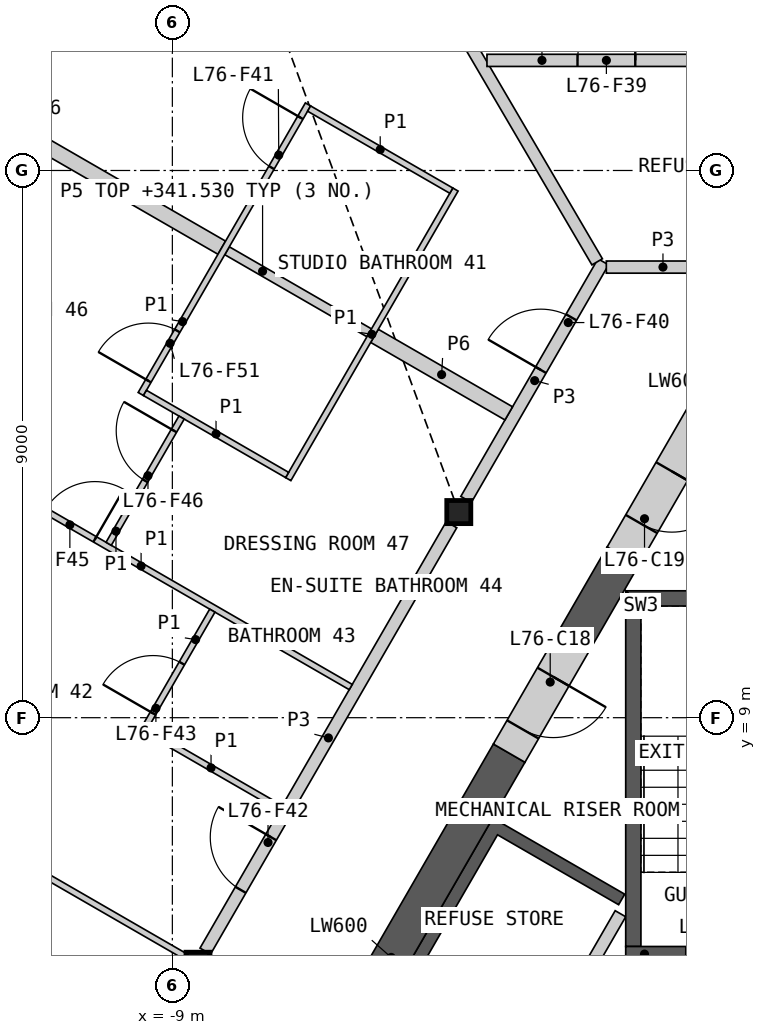
"""IFC4 building model, lengths in metres.
Left out: names, types, materials, properties, quantities, classifications, styles, units other than length and angle.
Written with IfcOpenShell. Run it as: python <this file> out.ifc"""

import sys

from ifc_helpers import new_model, si_unit, direction, frame, frame_2d, origin, origin_2d, place, context, subcontext, project, spatial, polyline, rectangle, i_section, outline, extrude, element, fill, save


model = new_model("IFC4")
c1 = context("Model", 3, precision=1e-05, world=origin(), true_north=direction((0.0, 1.0)))
c2 = subcontext(c1, "Body", "Model", "MODEL_VIEW")
j1 = project(units=[si_unit("LENGTHUNIT", "METRE"), si_unit("PLANEANGLEUNIT", "RADIAN")], contexts=[c1])
p1 = place(None, origin())
s1 = spatial("IfcSite", under=j1, at=p1, CompositionType="ELEMENT")
p2 = place(p1, origin())
s2 = spatial("IfcBuilding", under=s1, at=p2, CompositionType="ELEMENT")
p3 = place(p2, frame((0.0, 0.0, 339.2)))
s3 = spatial("IfcBuildingStorey", under=s2, at=p3, CompositionType="ELEMENT", Elevation=339.2)
for number, where, z_axis, x_axis in (
    (1, (-4.289, 12.382, 0.0), (0.0, 0.0, 1.0), (1.0, 0.0, 0.0)),
    (2, (-8.578, 4.953, 0.0), (0.0, 0.0, 1.0), (1.0, 0.0, 0.0)),
):
    element("IfcColumn", number, at=place(p3, frame(where, z_axis=z_axis, x_axis=x_axis)), inside=s3, PredefinedType="COLUMN", context=c2, shape_type="SweptSolid", body=[
        extrude(i_section(OverallWidth=0.396, OverallDepth=0.381, WebThickness=0.019, FlangeThickness=0.03, at=origin_2d()), origin(), (0.0, 0.0, 1.0), 3.4),
    ])
p4 = place(p3, origin())
e3 = element("IfcWall", 3, at=p4, inside=s3, PredefinedType="SHEAR", context=c2, shape_type="SweptSolid", body=[
    extrude(outline(polyline([(-4.96, 0.208), (-7.131, 1.461), (-3.731, 7.35), (-1.561, 6.097), (-1.66, 5.924), (-3.652, 7.074), (-5.752, 3.437), (-3.76, 2.287), (-3.861, 2.113), (-5.852, 3.263), (-6.852, 1.531), (-4.861, 0.381), (-4.96, 0.208)])), origin(), (0.0, 0.0, 1.0), 3.1),
])
p5 = place(p3, frame((-1.631, 5.776, 0.0), z_axis=(0.0, 0.0, 1.0), x_axis=(-0.499992876559, -0.866029516466, 0.0)))
e4 = element("IfcWall", 4, at=p5, inside=s3, PredefinedType="SOLIDWALL", context=c2, shape_type="SweptSolid", body=[
    extrude(rectangle(XDim=6.486, YDim=0.2, at=frame_2d((3.243, 0.0))), origin(), (0.0, 0.0, 1.0), 3.1),
])
p6 = place(p5, frame((1.537, 0.0, 0.0)))
e5 = element("IfcOpeningElement", 5, at=p6, cuts=e4, PredefinedType="OPENING", context=c2, shape_type="SweptSolid", body=[
    extrude(rectangle(XDim=0.9, YDim=2.1, at=frame_2d((0.45, 1.05))), frame((0.0, 0.11, 0.0), z_axis=(0.0, -1.0, 0.0), x_axis=(1.0, 0.0, 0.0)), (0.0, 0.0, 1.0), 0.22),
])
p7 = place(p5, frame((4.837, 0.0, 0.0)))
e6 = element("IfcOpeningElement", 6, at=p7, cuts=e4, PredefinedType="OPENING", context=c2, shape_type="SweptSolid", body=[
    extrude(rectangle(XDim=0.9, YDim=2.1, at=frame_2d((0.45, 1.05))), frame((0.0, 0.11, 0.0), z_axis=(0.0, -1.0, 0.0), x_axis=(1.0, 0.0, 0.0)), (0.0, 0.0, 1.0), 0.22),
])
p8 = place(p3, origin())
e7 = element("IfcWall", 7, at=p8, inside=s3, PredefinedType="SHEAR", context=c2, shape_type="SweptSolid", body=[
    extrude(outline(polyline([(1.544, 11.087), (-1.544, 11.087), (-1.294, 10.837), (1.294, 10.837), (1.544, 11.087)])), origin(), (0.0, 0.0, 1.0), 3.1),
])
p9 = place(p3, origin())
e8 = element("IfcWall", 8, at=p9, inside=s3, PredefinedType="SHEAR", context=c2, shape_type="SweptSolid", body=[
    extrude(outline(polyline([(-1.294, 10.837), (-1.544, 11.087), (-1.544, 5.237), (-1.294, 5.237), (-1.294, 10.837)])), origin(), (0.0, 0.0, 1.0), 3.1),
])
p10 = place(p3, frame((1.544, 5.112, 0.0), z_axis=(0.0, 0.0, 1.0), x_axis=(-1.0, 0.0, 0.0)))
e9 = element("IfcWall", 9, at=p10, inside=s3, PredefinedType="SHEAR", context=c2, shape_type="SweptSolid", body=[
    extrude(rectangle(XDim=3.088, YDim=0.25, at=frame_2d((1.544, 0.0))), origin(), (0.0, 0.0, 1.0), 3.1),
])
p11 = place(p10, frame((0.994, 0.0, 0.0)))
e10 = element("IfcOpeningElement", 10, at=p11, cuts=e9, PredefinedType="OPENING", context=c2, shape_type="SweptSolid", body=[
    extrude(rectangle(XDim=1.1, YDim=2.1, at=frame_2d((0.55, 1.05))), frame((0.0, 0.135, 0.0), z_axis=(0.0, -1.0, 0.0), x_axis=(1.0, 0.0, 0.0)), (0.0, 0.0, 1.0), 0.27),
])
p12 = place(p3, frame((-3.461, 8.417, 0.0), z_axis=(0.0, 0.0, 1.0), x_axis=(-0.50000391502, -0.866023143435, 0.0)))
e11 = element("IfcWall", 11, at=p12, inside=s3, PredefinedType="SHEAR", context=c2, shape_type="SweptSolid", body=[
    extrude(rectangle(XDim=7.759, YDim=0.6, at=frame_2d((3.879, 0.0))), origin(), (0.0, 0.0, 1.0), 3.1),
])
p13 = place(p3, frame((-1.59, 11.658, 0.0), z_axis=(0.0, 0.0, 1.0), x_axis=(-0.500037594623, -0.866003697431, 0.0)))
e12 = element("IfcWall", 12, at=p13, inside=s3, PredefinedType="SHEAR", context=c2, shape_type="SweptSolid", body=[
    extrude(rectangle(XDim=1.542, YDim=0.6, at=frame_2d((0.771, 0.0))), origin(), (0.0, 0.0, 1.0), 3.1),
])
p14 = place(p3, frame((-2.361, 10.322, 0.0), z_axis=(0.0, 0.0, 1.0), x_axis=(-0.499946605688, -0.86605622881, 0.0)))
e13 = element("IfcWall", 13, at=p14, inside=s3, PredefinedType="SHEAR", context=c2, shape_type="SweptSolid", body=[
    extrude(rectangle(XDim=2.2, YDim=0.6, at=frame_2d((1.1, 0.0))), origin(), (0.0, 0.0, 1.0), 3.1),
])
p15 = place(p14, frame((0.75, 0.0, 0.0)))
e14 = element("IfcOpeningElement", 14, at=p15, cuts=e13, PredefinedType="OPENING", context=c2, shape_type="SweptSolid", body=[
    extrude(rectangle(XDim=1.0, YDim=2.1, at=frame_2d((0.5, 1.05))), frame((0.0, 0.31, 0.0), z_axis=(0.0, -1.0, 0.0), x_axis=(1.0, 0.0, 0.0)), (0.0, 0.0, 1.0), 0.62),
])
p16 = place(p3, frame((-0.26, 13.961, 0.0), z_axis=(0.0, 0.0, 1.0), x_axis=(-0.49997936161, -0.866037319036, 0.0)))
e15 = element("IfcWall", 15, at=p16, inside=s3, PredefinedType="SHEAR", context=c2, shape_type="SweptSolid", body=[
    extrude(rectangle(XDim=2.66, YDim=0.6, at=frame_2d((1.33, 0.0))), origin(), (0.0, 0.0, 1.0), 3.1),
])
p17 = place(p16, frame((1.05, 0.0, 0.0)))
e16 = element("IfcOpeningElement", 16, at=p17, cuts=e15, PredefinedType="OPENING", context=c2, shape_type="SweptSolid", body=[
    extrude(rectangle(XDim=1.0, YDim=2.1, at=frame_2d((0.5, 1.05))), frame((0.0, 0.31, 0.0), z_axis=(0.0, -1.0, 0.0), x_axis=(1.0, 0.0, 0.0)), (0.0, 0.0, 1.0), 0.62),
])
p18 = place(p3, frame((-8.458, 5.16, 0.0), z_axis=(0.0, 0.0, 1.0), x_axis=(0.499984266882, 0.866034487114, 0.0)))
e17 = element("IfcWall", 17, at=p18, inside=s3, PredefinedType="PARTITIONING", context=c2, shape_type="SweptSolid", body=[
    extrude(rectangle(XDim=8.099, YDim=0.2, at=frame_2d((4.049, 0.0))), origin(), (0.0, 0.0, 1.0), 3.1),
])
p19 = place(p18, frame((1.164, 0.0, 0.0)))
e18 = element("IfcOpeningElement", 18, at=p19, cuts=e17, PredefinedType="OPENING", context=c2, shape_type="SweptSolid", body=[
    extrude(rectangle(XDim=1.0, YDim=2.1, at=frame_2d((0.5, 1.05))), frame((0.0, 0.11, 0.0), z_axis=(0.0, -1.0, 0.0), x_axis=(1.0, 0.0, 0.0)), (0.0, 0.0, 1.0), 0.22),
])
p20 = place(p3, frame((-14.417, 20.327, 0.0), z_axis=(0.0, 0.0, 1.0), x_axis=(0.866018271907, -0.50001235257, 0.0)))
e19 = element("IfcWall", 19, at=p20, inside=s3, PredefinedType="PARTITIONING", context=c2, shape_type="SweptSolid", body=[
    extrude(rectangle(XDim=7.193, YDim=0.25, at=frame_2d((3.596, 0.0))), origin(), (0.0, 0.0, 1.0), 2.33),
])
p21 = place(p3, frame((-4.169, 12.59, 0.0), z_axis=(0.0, 0.0, 1.0), x_axis=(0.499950370306, 0.866054055606, 0.0)))
e20 = element("IfcWall", 20, at=p21, inside=s3, PredefinedType="PARTITIONING", context=c2, shape_type="SweptSolid", body=[
    extrude(rectangle(XDim=4.513, YDim=0.2, at=frame_2d((2.256, 0.0))), origin(), (0.0, 0.0, 1.0), 3.1),
])
p22 = place(p21, frame((2.459, 0.0, 0.0)))
e21 = element("IfcOpeningElement", 21, at=p22, cuts=e20, PredefinedType="OPENING", context=c2, shape_type="SweptSolid", body=[
    extrude(rectangle(XDim=1.0, YDim=2.1, at=frame_2d((0.5, 1.05))), frame((0.0, 0.11, 0.0), z_axis=(0.0, -1.0, 0.0), x_axis=(1.0, 0.0, 0.0)), (0.0, 0.0, 1.0), 0.22),
])
p23 = place(p3, frame((-1.863, 16.411, 0.0), z_axis=(0.0, 0.0, 1.0), x_axis=(1.0, 0.0, 0.0)))
e22 = element("IfcWall", 22, at=p23, inside=s3, PredefinedType="PARTITIONING", context=c2, shape_type="SweptSolid", body=[
    extrude(rectangle(XDim=3.726, YDim=0.2, at=frame_2d((1.863, 0.0))), origin(), (0.0, 0.0, 1.0), 3.1),
])
p24 = place(p23, frame((1.388, 0.0, 0.0)))
e23 = element("IfcOpeningElement", 23, at=p24, cuts=e22, PredefinedType="OPENING", context=c2, shape_type="SweptSolid", body=[
    extrude(rectangle(XDim=0.95, YDim=2.1, at=frame_2d((0.475, 1.05))), frame((0.0, 0.11, 0.0), z_axis=(0.0, -1.0, 0.0), x_axis=(1.0, 0.0, 0.0)), (0.0, 0.0, 1.0), 0.22),
])
p25 = place(p3, frame((-5.676, 15.28, 0.0), z_axis=(0.0, 0.0, 1.0), x_axis=(0.865989465428, -0.500062241894, 0.0)))
e24 = element("IfcWall", 24, at=p25, inside=s3, PredefinedType="PARTITIONING", context=c2, shape_type="SweptSolid", body=[
    extrude(rectangle(XDim=2.55, YDim=0.25, at=frame_2d((1.275, 0.0))), origin(), (0.0, 0.0, 1.0), 2.33),
])
p26 = place(p3, frame((-9.292, 28.919, 0.0), z_axis=(0.0, 0.0, 1.0), x_axis=(0.505558038556, -0.862792599442, 0.0)))
e25 = element("IfcWall", 25, at=p26, inside=s3, PredefinedType="PARTITIONING", context=c2, shape_type="SweptSolid", body=[
    extrude(rectangle(XDim=14.397, YDim=0.2, at=frame_2d((7.199, 0.0))), origin(), (0.0, 0.0, 1.0), 2.33),
])
p27 = place(p3, frame((-3.826, 19.811, 0.0), z_axis=(0.0, 0.0, 1.0), x_axis=(1.0, 0.0, 0.0)))
e26 = element("IfcWall", 26, at=p27, inside=s3, PredefinedType="PARTITIONING", context=c2, shape_type="SweptSolid", body=[
    extrude(rectangle(XDim=3.618, YDim=0.2, at=frame_2d((1.809, 0.0))), origin(), (0.0, 0.0, 1.0), 2.33),
])
p28 = place(p27, frame((1.489, 0.0, 0.0)))
e27 = element("IfcOpeningElement", 27, at=p28, cuts=e26, PredefinedType="OPENING", context=c2, shape_type="SweptSolid", body=[
    extrude(rectangle(XDim=0.95, YDim=2.1, at=frame_2d((0.475, 1.05))), frame((0.0, 0.11, 0.0), z_axis=(0.0, -1.0, 0.0), x_axis=(1.0, 0.0, 0.0)), (0.0, 0.0, 1.0), 0.22),
])
p29 = place(p3, frame((-8.101, 16.68, 0.0), z_axis=(0.0, 0.0, 1.0), x_axis=(0.866019956843, -0.50000943426, 0.0)))
e28 = element("IfcWall", 28, at=p29, inside=s3, PredefinedType="PLUMBINGWALL", context=c2, shape_type="SweptSolid", body=[
    extrude(rectangle(XDim=2.7, YDim=0.15, at=frame_2d((1.35, 0.0))), origin(), (0.0, 0.0, 1.0), 2.33),
])
p30 = place(p3, frame((-19.615, 11.325, 0.0), z_axis=(0.0, 0.0, 1.0), x_axis=(0.86602139559, -0.500006942333, 0.0)))
e29 = element("IfcWall", 29, at=p30, inside=s3, PredefinedType="PARTITIONING", context=c2, shape_type="SweptSolid", body=[
    extrude(rectangle(XDim=12.505, YDim=0.1, at=frame_2d((6.252, 0.0))), origin(), (0.0, 0.0, 1.0), 2.33),
])
p31 = place(p30, frame((6.38, 0.0, 0.0)))
e30 = element("IfcOpeningElement", 30, at=p31, cuts=e29, PredefinedType="OPENING", context=c2, shape_type="SweptSolid", body=[
    extrude(rectangle(XDim=0.95, YDim=2.1, at=frame_2d((0.475, 1.05))), frame((0.0, 0.06, 0.0), z_axis=(0.0, -1.0, 0.0), x_axis=(1.0, 0.0, 0.0)), (0.0, 0.0, 1.0), 0.12),
])
p32 = place(p3, frame((-12.962, 13.485, 0.0), z_axis=(0.0, 0.0, 1.0), x_axis=(0.866021168401, -0.500007335828, 0.0)))
e31 = element("IfcWall", 31, at=p32, inside=s3, PredefinedType="PARTITIONING", context=c2, shape_type="SweptSolid", body=[
    extrude(rectangle(XDim=7.962, YDim=0.1, at=frame_2d((3.981, 0.0))), origin(), (0.0, 0.0, 1.0), 2.33),
])
p33 = place(p32, frame((2.154, 0.0, 0.0)))
e32 = element("IfcOpeningElement", 32, at=p33, cuts=e31, PredefinedType="OPENING", context=c2, shape_type="SweptSolid", body=[
    extrude(rectangle(XDim=0.95, YDim=2.1, at=frame_2d((0.475, 1.05))), frame((0.0, 0.06, 0.0), z_axis=(0.0, -1.0, 0.0), x_axis=(1.0, 0.0, 0.0)), (0.0, 0.0, 1.0), 0.12),
])
p34 = place(p3, frame((-7.094, 12.924, 0.0), z_axis=(0.0, 0.0, 1.0), x_axis=(0.499996545922, 0.866027397988, 0.0)))
e33 = element("IfcWall", 33, at=p34, inside=s3, PredefinedType="PARTITIONING", context=c2, shape_type="SweptSolid", body=[
    extrude(rectangle(XDim=5.5, YDim=0.1, at=frame_2d((2.75, 0.0))), origin(), (0.0, 0.0, 1.0), 2.33),
])
p35 = place(p3, frame((-9.519, 14.323, 0.0), z_axis=(0.0, 0.0, 1.0), x_axis=(0.499996545922, 0.866027397988, 0.0)))
e34 = element("IfcWall", 34, at=p35, inside=s3, PredefinedType="PARTITIONING", context=c2, shape_type="SweptSolid", body=[
    extrude(rectangle(XDim=5.5, YDim=0.1, at=frame_2d((2.75, 0.0))), origin(), (0.0, 0.0, 1.0), 2.33),
])
p36 = place(p35, frame((4.3, 0.0, 0.0)))
e35 = element("IfcOpeningElement", 35, at=p36, cuts=e34, PredefinedType="OPENING", context=c2, shape_type="SweptSolid", body=[
    extrude(rectangle(XDim=0.95, YDim=2.1, at=frame_2d((0.475, 1.05))), frame((0.0, 0.06, 0.0), z_axis=(0.0, -1.0, 0.0), x_axis=(1.0, 0.0, 0.0)), (0.0, 0.0, 1.0), 0.12),
])
p37 = place(p35, frame((0.25, 0.0, 0.0)))
e36 = element("IfcOpeningElement", 36, at=p37, cuts=e34, PredefinedType="OPENING", context=c2, shape_type="SweptSolid", body=[
    extrude(rectangle(XDim=0.95, YDim=2.1, at=frame_2d((0.475, 1.05))), frame((0.0, 0.06, 0.0), z_axis=(0.0, -1.0, 0.0), x_axis=(1.0, 0.0, 0.0)), (0.0, 0.0, 1.0), 0.12),
])
for number, where, z_axis, x_axis in (
    (37, (-9.451, 14.342, 0.0), (0.0, 0.0, 1.0), (0.866, -0.5, 0.0)),
    (38, (-6.751, 19.018, 0.0), (0.0, 0.0, 1.0), (0.866, -0.5, 0.0)),
):
    element("IfcWall", number, at=place(p3, frame(where, z_axis=z_axis, x_axis=x_axis)), inside=s3, PredefinedType="PARTITIONING", context=c2, shape_type="SweptSolid", body=[
        extrude(rectangle(XDim=2.7, YDim=0.1, at=frame_2d((1.35, 0.0))), origin(), (0.0, 0.0, 1.0), 2.33),
    ])
p38 = place(p3, frame((-9.511, 8.837, 0.0), z_axis=(0.0, 0.0, 1.0), x_axis=(0.866029095148, -0.499993606316, 0.0)))
e39 = element("IfcWall", 39, at=p38, inside=s3, PredefinedType="PARTITIONING", context=c2, shape_type="SweptSolid", body=[
    extrude(rectangle(XDim=2.65, YDim=0.1, at=frame_2d((1.325, 0.0))), origin(), (0.0, 0.0, 1.0), 2.33),
])
p39 = place(p3, frame((-10.047, 11.86, 0.0), z_axis=(0.0, 0.0, 1.0), x_axis=(0.500092661743, 0.865971898892, 0.0)))
e40 = element("IfcWall", 40, at=p39, inside=s3, PredefinedType="PARTITIONING", context=c2, shape_type="SweptSolid", body=[
    extrude(rectangle(XDim=2.397, YDim=0.1, at=frame_2d((1.199, 0.0))), origin(), (0.0, 0.0, 1.0), 2.33),
])
p40 = place(p39, frame((1.198, 0.0, 0.0)))
e41 = element("IfcOpeningElement", 41, at=p40, cuts=e40, PredefinedType="OPENING", context=c2, shape_type="SweptSolid", body=[
    extrude(rectangle(XDim=0.95, YDim=2.1, at=frame_2d((0.475, 1.05))), frame((0.0, 0.06, 0.0), z_axis=(0.0, -1.0, 0.0), x_axis=(1.0, 0.0, 0.0)), (0.0, 0.0, 1.0), 0.12),
])
p41 = place(p3, frame((-9.443, 8.855, 0.0), z_axis=(0.0, 0.0, 1.0), x_axis=(0.50002983664, 0.866008176907, 0.0)))
e42 = element("IfcWall", 42, at=p41, inside=s3, PredefinedType="PARTITIONING", context=c2, shape_type="SweptSolid", body=[
    extrude(rectangle(XDim=2.2, YDim=0.1, at=frame_2d((1.1, 0.0))), origin(), (0.0, 0.0, 1.0), 2.33),
])
p42 = place(p41, frame((0.25, 0.0, 0.0)))
e43 = element("IfcOpeningElement", 43, at=p42, cuts=e42, PredefinedType="OPENING", context=c2, shape_type="SweptSolid", body=[
    extrude(rectangle(XDim=0.95, YDim=2.1, at=frame_2d((0.475, 1.05))), frame((0.0, 0.06, 0.0), z_axis=(0.0, -1.0, 0.0), x_axis=(1.0, 0.0, 0.0)), (0.0, 0.0, 1.0), 0.12),
])
p43 = place(p11, origin())
e44 = element("IfcDoor", 44, at=p43, inside=s3, OperationType="SINGLE_SWING_RIGHT", PredefinedType="DOOR", context=c2, shape_type="SweptSolid", body=[
    extrude(rectangle(XDim=1.1, YDim=2.1, at=frame_2d((0.55, 1.05))), frame((0.0, 0.025, 0.0), z_axis=(0.0, -1.0, 0.0), x_axis=(1.0, 0.0, 0.0)), (0.0, 0.0, 1.0), 0.05),
])
fill(e10, e44)
p44 = place(p15, origin())
e45 = element("IfcDoor", 45, at=p44, inside=s3, OperationType="SINGLE_SWING_LEFT", PredefinedType="DOOR", context=c2, shape_type="SweptSolid", body=[
    extrude(rectangle(XDim=1.0, YDim=2.1, at=frame_2d((0.5, 1.05))), frame((0.0, 0.055, 0.0), z_axis=(0.0, -1.0, 0.0), x_axis=(1.0, 0.0, 0.0)), (0.0, 0.0, 1.0), 0.05),
])
fill(e14, e45)
p45 = place(p17, origin())
e46 = element("IfcDoor", 46, at=p45, inside=s3, OperationType="SINGLE_SWING_LEFT", PredefinedType="DOOR", context=c2, shape_type="SweptSolid", body=[
    extrude(rectangle(XDim=1.0, YDim=2.1, at=frame_2d((0.5, 1.05))), frame((0.0, 0.055, 0.0), z_axis=(0.0, -1.0, 0.0), x_axis=(1.0, 0.0, 0.0)), (0.0, 0.0, 1.0), 0.05),
])
fill(e16, e46)
p46 = place(p28, origin())
e47 = element("IfcDoor", 47, at=p46, inside=s3, OperationType="SINGLE_SWING_RIGHT", PredefinedType="DOOR", context=c2, shape_type="SweptSolid", body=[
    extrude(rectangle(XDim=0.95, YDim=2.1, at=frame_2d((0.475, 1.05))), frame((0.0, 0.025, 0.0), z_axis=(0.0, -1.0, 0.0), x_axis=(1.0, 0.0, 0.0)), (0.0, 0.0, 1.0), 0.05),
])
fill(e27, e47)
p47 = place(p22, origin())
e48 = element("IfcDoor", 48, at=p47, inside=s3, OperationType="SINGLE_SWING_LEFT", PredefinedType="DOOR", context=c2, shape_type="SweptSolid", body=[
    extrude(rectangle(XDim=1.0, YDim=2.1, at=frame_2d((0.5, 1.05))), frame((0.0, 0.025, 0.0), z_axis=(0.0, -1.0, 0.0), x_axis=(1.0, 0.0, 0.0)), (0.0, 0.0, 1.0), 0.05),
])
fill(e21, e48)
p48 = place(p36, origin())
e49 = element("IfcDoor", 49, at=p48, inside=s3, OperationType="SINGLE_SWING_RIGHT", PredefinedType="DOOR", context=c2, shape_type="SweptSolid", body=[
    extrude(rectangle(XDim=0.95, YDim=2.1, at=frame_2d((0.475, 1.05))), frame((0.0, 0.025, 0.0), z_axis=(0.0, -1.0, 0.0), x_axis=(1.0, 0.0, 0.0)), (0.0, 0.0, 1.0), 0.05),
])
fill(e35, e49)
p49 = place(p19, origin())
e50 = element("IfcDoor", 50, at=p49, inside=s3, OperationType="SINGLE_SWING_RIGHT", PredefinedType="DOOR", context=c2, shape_type="SweptSolid", body=[
    extrude(rectangle(XDim=1.0, YDim=2.1, at=frame_2d((0.5, 1.05))), frame((0.0, 0.025, 0.0), z_axis=(0.0, -1.0, 0.0), x_axis=(1.0, 0.0, 0.0)), (0.0, 0.0, 1.0), 0.05),
])
fill(e18, e50)
p50 = place(p42, origin())
e51 = element("IfcDoor", 51, at=p50, inside=s3, OperationType="SINGLE_SWING_LEFT", PredefinedType="DOOR", context=c2, shape_type="SweptSolid", body=[
    extrude(rectangle(XDim=0.95, YDim=2.1, at=frame_2d((0.475, 1.05))), frame((0.0, 0.025, 0.0), z_axis=(0.0, -1.0, 0.0), x_axis=(1.0, 0.0, 0.0)), (0.0, 0.0, 1.0), 0.05),
])
fill(e43, e51)
p51 = place(p33, origin())
e52 = element("IfcDoor", 52, at=p51, inside=s3, OperationType="SINGLE_SWING_RIGHT", PredefinedType="DOOR", context=c2, shape_type="SweptSolid", body=[
    extrude(rectangle(XDim=0.95, YDim=2.1, at=frame_2d((0.475, 1.05))), frame((0.0, 0.025, 0.0), z_axis=(0.0, -1.0, 0.0), x_axis=(1.0, 0.0, 0.0)), (0.0, 0.0, 1.0), 0.05),
])
fill(e32, e52)
p52 = place(p40, origin())
e53 = element("IfcDoor", 53, at=p52, inside=s3, OperationType="SINGLE_SWING_RIGHT", PredefinedType="DOOR", context=c2, shape_type="SweptSolid", body=[
    extrude(rectangle(XDim=0.95, YDim=2.1, at=frame_2d((0.475, 1.05))), frame((0.0, 0.025, 0.0), z_axis=(0.0, -1.0, 0.0), x_axis=(1.0, 0.0, 0.0)), (0.0, 0.0, 1.0), 0.05),
])
fill(e41, e53)
p53 = place(p37, origin())
e54 = element("IfcDoor", 54, at=p53, inside=s3, OperationType="SINGLE_SWING_LEFT", PredefinedType="DOOR", context=c2, shape_type="SweptSolid", body=[
    extrude(rectangle(XDim=0.95, YDim=2.1, at=frame_2d((0.475, 1.05))), frame((0.0, 0.025, 0.0), z_axis=(0.0, -1.0, 0.0), x_axis=(1.0, 0.0, 0.0)), (0.0, 0.0, 1.0), 0.05),
])
fill(e36, e54)
save(model, sys.argv[1])
